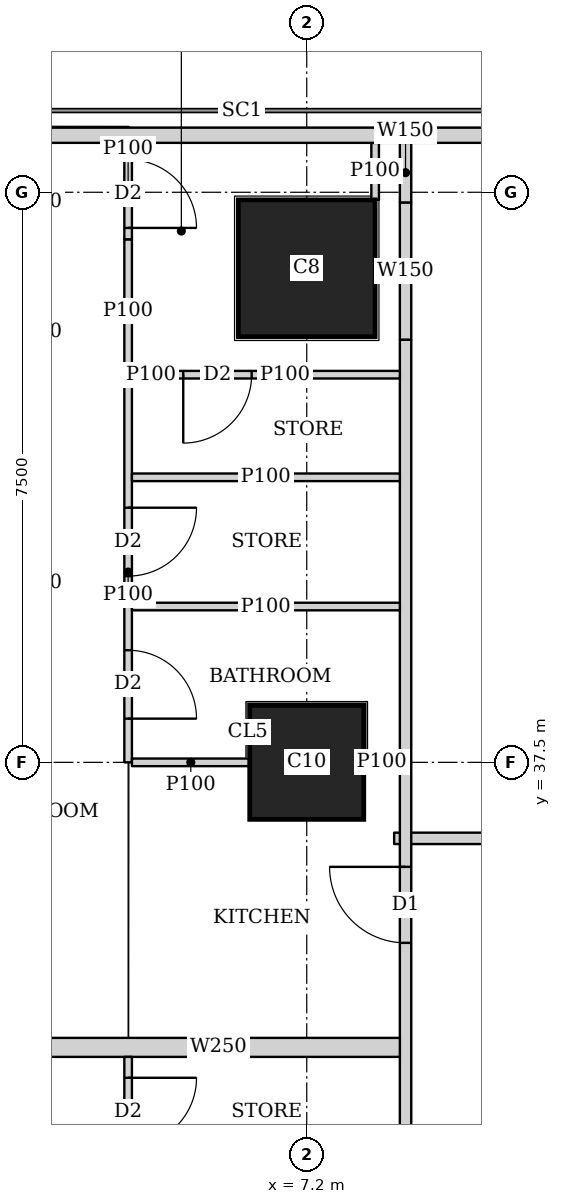
"""IFC4 building model, lengths in metres.
Left out: names, types, materials, properties, quantities, classifications, styles, units other than length and angle.
Written with IfcOpenShell. Run it as: python <this file> out.ifc"""

import sys

from ifc_helpers import new_model, si_unit, direction, frame, frame_2d, origin, origin_2d, place, context, subcontext, project, spatial, rectangle, extrude, element, fill, save


model = new_model("IFC4")
c1 = context("Model", 3, precision=1e-05, world=origin(), true_north=direction((0.0, 1.0)))
c2 = subcontext(c1, "Body", "Model", "MODEL_VIEW")
j1 = project(units=[si_unit("LENGTHUNIT", "METRE"), si_unit("PLANEANGLEUNIT", "RADIAN")], contexts=[c1])
p1 = place(None, origin())
s1 = spatial("IfcSite", under=j1, at=p1, CompositionType="ELEMENT")
p2 = place(p1, origin())
s2 = spatial("IfcBuilding", under=s1, at=p2, CompositionType="ELEMENT")
p3 = place(p2, frame((0.0, 0.0, 139.55)))
s3 = spatial("IfcBuildingStorey", under=s2, at=p3, CompositionType="ELEMENT", Elevation=139.55)
p4 = place(p3, frame((7.2, 37.5, 0.0), z_axis=(0.0, 0.0, 1.0), x_axis=(1.0, 0.0, 0.0)))
e1 = element("IfcColumn", 1, at=p4, inside=s3, PredefinedType="COLUMN", context=c2, shape_type="SweptSolid", body=[
    extrude(rectangle(XDim=1.5, YDim=1.5, at=origin_2d()), origin(), (0.0, 0.0, 1.0), 3.75),
])
p5 = place(p3, frame((7.2, 44.0, 0.0), z_axis=(0.0, 0.0, 1.0), x_axis=(1.0, 0.0, 0.0)))
e2 = element("IfcColumn", 2, at=p5, inside=s3, PredefinedType="COLUMN", context=c2, shape_type="SweptSolid", body=[
    extrude(rectangle(XDim=1.8, YDim=1.8, at=origin_2d()), origin(), (0.0, 0.0, 1.0), 3.75),
])
p6 = place(p3, frame((40.106, 45.75, 0.0), z_axis=(0.0, 0.0, 1.0), x_axis=(-1.0, 0.0, 0.0)))
e3 = element("IfcWall", 3, at=p6, inside=s3, PredefinedType="SOLIDWALL", context=c2, shape_type="SweptSolid", body=[
    extrude(rectangle(XDim=37.943, YDim=0.2, at=frame_2d((18.971, 0.0))), origin(), (0.0, 0.0, 1.0), 3.5),
])
p7 = place(p6, frame((8.606, 0.0, 0.9)))
e4 = element("IfcOpeningElement", 4, at=p7, cuts=e3, PredefinedType="OPENING", context=c2, shape_type="SweptSolid", body=[
    extrude(rectangle(XDim=1.8, YDim=1.5, at=frame_2d((0.9, 0.75))), frame((0.0, 0.11, 0.0), z_axis=(0.0, -1.0, 0.0), x_axis=(1.0, 0.0, 0.0)), (0.0, 0.0, 1.0), 0.22),
])
p8 = place(p6, frame((12.206, 0.0, 0.9)))
e5 = element("IfcOpeningElement", 5, at=p8, cuts=e3, PredefinedType="OPENING", context=c2, shape_type="SweptSolid", body=[
    extrude(rectangle(XDim=1.8, YDim=1.5, at=frame_2d((0.9, 0.75))), frame((0.0, 0.11, 0.0), z_axis=(0.0, -1.0, 0.0), x_axis=(1.0, 0.0, 0.0)), (0.0, 0.0, 1.0), 0.22),
])
p9 = place(p6, frame((15.806, 0.0, 0.9)))
e6 = element("IfcOpeningElement", 6, at=p9, cuts=e3, PredefinedType="OPENING", context=c2, shape_type="SweptSolid", body=[
    extrude(rectangle(XDim=1.8, YDim=1.5, at=frame_2d((0.9, 0.75))), frame((0.0, 0.11, 0.0), z_axis=(0.0, -1.0, 0.0), x_axis=(1.0, 0.0, 0.0)), (0.0, 0.0, 1.0), 0.22),
])
p10 = place(p6, frame((19.406, 0.0, 0.9)))
e7 = element("IfcOpeningElement", 7, at=p10, cuts=e3, PredefinedType="OPENING", context=c2, shape_type="SweptSolid", body=[
    extrude(rectangle(XDim=1.8, YDim=1.5, at=frame_2d((0.9, 0.75))), frame((0.0, 0.11, 0.0), z_axis=(0.0, -1.0, 0.0), x_axis=(1.0, 0.0, 0.0)), (0.0, 0.0, 1.0), 0.22),
])
p11 = place(p6, frame((23.006, 0.0, 0.9)))
e8 = element("IfcOpeningElement", 8, at=p11, cuts=e3, PredefinedType="OPENING", context=c2, shape_type="SweptSolid", body=[
    extrude(rectangle(XDim=1.8, YDim=1.5, at=frame_2d((0.9, 0.75))), frame((0.0, 0.11, 0.0), z_axis=(0.0, -1.0, 0.0), x_axis=(1.0, 0.0, 0.0)), (0.0, 0.0, 1.0), 0.22),
])
p12 = place(p6, frame((26.606, 0.0, 0.9)))
e9 = element("IfcOpeningElement", 9, at=p12, cuts=e3, PredefinedType="OPENING", context=c2, shape_type="SweptSolid", body=[
    extrude(rectangle(XDim=1.8, YDim=1.5, at=frame_2d((0.9, 0.75))), frame((0.0, 0.11, 0.0), z_axis=(0.0, -1.0, 0.0), x_axis=(1.0, 0.0, 0.0)), (0.0, 0.0, 1.0), 0.22),
])
p13 = place(p3, frame((8.5, 1.964, 0.0), z_axis=(0.0, 0.0, 1.0), x_axis=(0.0, 1.0, 0.0)))
e10 = element("IfcWall", 10, at=p13, inside=s3, PredefinedType="SOLIDWALL", context=c2, shape_type="SweptSolid", body=[
    extrude(rectangle(XDim=41.097, YDim=0.15, at=frame_2d((20.548, 0.0))), origin(), (0.0, 0.0, 1.0), 3.5),
])
p14 = place(p13, frame((6.911, 0.0, 0.0)))
e11 = element("IfcOpeningElement", 11, at=p14, cuts=e10, PredefinedType="OPENING", context=c2, shape_type="SweptSolid", body=[
    extrude(rectangle(XDim=1.0, YDim=2.1, at=frame_2d((0.5, 1.05))), frame((0.0, 0.085, 0.0), z_axis=(0.0, -1.0, 0.0), x_axis=(1.0, 0.0, 0.0)), (0.0, 0.0, 1.0), 0.17),
])
p15 = place(p13, frame((10.661, 0.0, 0.0)))
e12 = element("IfcOpeningElement", 12, at=p15, cuts=e10, PredefinedType="OPENING", context=c2, shape_type="SweptSolid", body=[
    extrude(rectangle(XDim=1.0, YDim=2.1, at=frame_2d((0.5, 1.05))), frame((0.0, 0.085, 0.0), z_axis=(0.0, -1.0, 0.0), x_axis=(1.0, 0.0, 0.0)), (0.0, 0.0, 1.0), 0.17),
])
p16 = place(p13, frame((25.661, 0.0, 0.0)))
e13 = element("IfcOpeningElement", 13, at=p16, cuts=e10, PredefinedType="OPENING", context=c2, shape_type="SweptSolid", body=[
    extrude(rectangle(XDim=1.0, YDim=2.1, at=frame_2d((0.5, 1.05))), frame((0.0, 0.085, 0.0), z_axis=(0.0, -1.0, 0.0), x_axis=(1.0, 0.0, 0.0)), (0.0, 0.0, 1.0), 0.17),
])
p17 = place(p13, frame((33.161, 0.0, 0.0)))
e14 = element("IfcOpeningElement", 14, at=p17, cuts=e10, PredefinedType="OPENING", context=c2, shape_type="SweptSolid", body=[
    extrude(rectangle(XDim=1.0, YDim=2.1, at=frame_2d((0.5, 1.05))), frame((0.0, 0.085, 0.0), z_axis=(0.0, -1.0, 0.0), x_axis=(1.0, 0.0, 0.0)), (0.0, 0.0, 1.0), 0.17),
])
p18 = place(p3, frame((8.5, 43.061, 0.0), z_axis=(0.0, 0.0, 1.0), x_axis=(0.0, 1.0, 0.0)))
e15 = element("IfcWall", 15, at=p18, inside=s3, PredefinedType="SOLIDWALL", context=c2, shape_type="SweptSolid", body=[
    extrude(rectangle(XDim=1.805, YDim=0.15, at=frame_2d((0.902, 0.0))), origin(), (0.0, 0.0, 1.0), 2.1),
])
p19 = place(p3, frame((8.5, 44.866, 0.0), z_axis=(0.0, 0.0, 1.0), x_axis=(0.0, 1.0, 0.0)))
e16 = element("IfcWall", 16, at=p19, inside=s3, PredefinedType="SOLIDWALL", context=c2, shape_type="SweptSolid", body=[
    extrude(rectangle(XDim=0.784, YDim=0.15, at=frame_2d((0.392, 0.0))), origin(), (0.0, 0.0, 1.0), 3.5),
])
p20 = place(p3, frame((8.35, 36.5, 0.0), z_axis=(0.0, 0.0, 1.0), x_axis=(1.0, 0.0, 0.0)))
e17 = element("IfcWall", 17, at=p20, inside=s3, PredefinedType="SOLIDWALL", context=c2, shape_type="SweptSolid", body=[
    extrude(rectangle(XDim=26.415, YDim=0.15, at=frame_2d((13.208, 0.0))), origin(), (0.0, 0.0, 1.0), 3.5),
])
p21 = place(p20, frame((2.6, 0.0, 0.0)))
e18 = element("IfcOpeningElement", 18, at=p21, cuts=e17, PredefinedType="OPENING", context=c2, shape_type="SweptSolid", body=[
    extrude(rectangle(XDim=1.0, YDim=2.1, at=frame_2d((0.5, 1.05))), frame((0.0, 0.085, 0.0), z_axis=(0.0, -1.0, 0.0), x_axis=(1.0, 0.0, 0.0)), (0.0, 0.0, 1.0), 0.17),
])
p22 = place(p20, frame((10.75, 0.0, 0.0)))
e19 = element("IfcOpeningElement", 19, at=p22, cuts=e17, PredefinedType="OPENING", context=c2, shape_type="SweptSolid", body=[
    extrude(rectangle(XDim=1.0, YDim=2.1, at=frame_2d((0.5, 1.05))), frame((0.0, 0.085, 0.0), z_axis=(0.0, -1.0, 0.0), x_axis=(1.0, 0.0, 0.0)), (0.0, 0.0, 1.0), 0.17),
])
p23 = place(p3, frame((8.1, 45.65, 0.0), z_axis=(0.0, 0.0, 1.0), x_axis=(0.0, -1.0, 0.0)))
e20 = element("IfcWall", 20, at=p23, inside=s3, PredefinedType="PARTITIONING", context=c2, shape_type="SweptSolid", body=[
    extrude(rectangle(XDim=0.749, YDim=0.1, at=frame_2d((0.375, 0.0))), origin(), (0.0, 0.0, 1.0), 3.5),
])
p24 = place(p3, frame((4.85, 30.0, 0.0), z_axis=(0.0, 0.0, 1.0), x_axis=(0.0, 1.0, 0.0)))
e21 = element("IfcWall", 21, at=p24, inside=s3, PredefinedType="PARTITIONING", context=c2, shape_type="SweptSolid", body=[
    extrude(rectangle(XDim=3.625, YDim=0.1, at=frame_2d((1.812, 0.0))), origin(), (0.0, 0.0, 1.0), 3.5),
])
p25 = place(p24, frame((0.575, 0.0, 0.0)))
e22 = element("IfcOpeningElement", 22, at=p25, cuts=e21, PredefinedType="OPENING", context=c2, shape_type="SweptSolid", body=[
    extrude(rectangle(XDim=0.9, YDim=2.1, at=frame_2d((0.45, 1.05))), frame((0.0, 0.06, 0.0), z_axis=(0.0, -1.0, 0.0), x_axis=(1.0, 0.0, 0.0)), (0.0, 0.0, 1.0), 0.12),
])
p26 = place(p24, frame((2.45, 0.0, 0.0)))
e23 = element("IfcOpeningElement", 23, at=p26, cuts=e21, PredefinedType="OPENING", context=c2, shape_type="SweptSolid", body=[
    extrude(rectangle(XDim=0.9, YDim=2.1, at=frame_2d((0.45, 1.05))), frame((0.0, 0.06, 0.0), z_axis=(0.0, -1.0, 0.0), x_axis=(1.0, 0.0, 0.0)), (0.0, 0.0, 1.0), 0.12),
])
p27 = place(p3, frame((4.85, 37.5, 0.0), z_axis=(0.0, 0.0, 1.0), x_axis=(0.0, 1.0, 0.0)))
e24 = element("IfcWall", 24, at=p27, inside=s3, PredefinedType="PARTITIONING", context=c2, shape_type="SweptSolid", body=[
    extrude(rectangle(XDim=5.007, YDim=0.1, at=frame_2d((2.503, 0.0))), origin(), (0.0, 0.0, 1.0), 3.5),
])
p28 = place(p27, frame((0.575, 0.0, 0.0)))
e25 = element("IfcOpeningElement", 25, at=p28, cuts=e24, PredefinedType="OPENING", context=c2, shape_type="SweptSolid", body=[
    extrude(rectangle(XDim=0.9, YDim=2.1, at=frame_2d((0.45, 1.05))), frame((0.0, 0.06, 0.0), z_axis=(0.0, -1.0, 0.0), x_axis=(1.0, 0.0, 0.0)), (0.0, 0.0, 1.0), 0.12),
])
p29 = place(p27, frame((2.45, 0.0, 0.0)))
e26 = element("IfcOpeningElement", 26, at=p29, cuts=e24, PredefinedType="OPENING", context=c2, shape_type="SweptSolid", body=[
    extrude(rectangle(XDim=0.9, YDim=2.1, at=frame_2d((0.45, 1.05))), frame((0.0, 0.06, 0.0), z_axis=(0.0, -1.0, 0.0), x_axis=(1.0, 0.0, 0.0)), (0.0, 0.0, 1.0), 0.12),
])
p30 = place(p3, frame((4.85, 42.507, 0.0), z_axis=(0.0, 0.0, 1.0), x_axis=(0.0, 1.0, 0.0)))
e27 = element("IfcWall", 27, at=p30, inside=s3, PredefinedType="PARTITIONING", context=c2, shape_type="SweptSolid", body=[
    extrude(rectangle(XDim=1.874, YDim=0.1, at=frame_2d((0.937, 0.0))), origin(), (0.0, 0.0, 1.0), 2.1),
])
p31 = place(p3, frame((4.85, 44.381, 0.0), z_axis=(0.0, 0.0, 1.0), x_axis=(0.0, 1.0, 0.0)))
e28 = element("IfcWall", 28, at=p31, inside=s3, PredefinedType="PARTITIONING", context=c2, shape_type="SweptSolid", body=[
    extrude(rectangle(XDim=1.269, YDim=0.1, at=frame_2d((0.634, 0.0))), origin(), (0.0, 0.0, 1.0), 3.5),
])
p32 = place(p31, frame((0.15, 0.0, 0.0)))
e29 = element("IfcOpeningElement", 29, at=p32, cuts=e28, PredefinedType="OPENING", context=c2, shape_type="SweptSolid", body=[
    extrude(rectangle(XDim=0.9, YDim=2.1, at=frame_2d((0.45, 1.05))), frame((0.0, 0.06, 0.0), z_axis=(0.0, -1.0, 0.0), x_axis=(1.0, 0.0, 0.0)), (0.0, 0.0, 1.0), 0.12),
])
p33 = place(p3, frame((4.9, 37.5, 0.0), z_axis=(0.0, 0.0, 1.0), x_axis=(1.0, 0.0, 0.0)))
e30 = element("IfcWall", 30, at=p33, inside=s3, PredefinedType="PARTITIONING", context=c2, shape_type="SweptSolid", body=[
    extrude(rectangle(XDim=1.549, YDim=0.1, at=frame_2d((0.774, 0.0))), origin(), (0.0, 0.0, 1.0), 3.5),
])
p34 = place(p3, frame((7.951, 37.5, 0.0), z_axis=(0.0, 0.0, 1.0), x_axis=(1.0, 0.0, 0.0)))
e31 = element("IfcWall", 31, at=p34, inside=s3, PredefinedType="PARTITIONING", context=c2, shape_type="SweptSolid", body=[
    extrude(rectangle(XDim=0.474, YDim=0.1, at=frame_2d((0.237, 0.0))), origin(), (0.0, 0.0, 1.0), 3.5),
])
for number, where, z_axis, x_axis in (
    (32, (4.9, 41.25, 0.0), (0.0, 0.0, 1.0), (1.0, 0.0, 0.0)),
    (33, (4.9, 39.55, 0.0), (0.0, 0.0, 1.0), (1.0, 0.0, 0.0)),
):
    element("IfcWall", number, at=place(p3, frame(where, z_axis=z_axis, x_axis=x_axis)), inside=s3, PredefinedType="PARTITIONING", context=c2, shape_type="SweptSolid", body=[
        extrude(rectangle(XDim=3.525, YDim=0.1, at=frame_2d((1.763, 0.0))), origin(), (0.0, 0.0, 1.0), 3.5),
    ])
p35 = place(p3, frame((3.65, 33.75, 0.0), z_axis=(0.0, 0.0, 1.0), x_axis=(1.0, 0.0, 0.0)))
e34 = element("IfcWall", 34, at=p35, inside=s3, PredefinedType="SOLIDWALL", context=c2, shape_type="SweptSolid", body=[
    extrude(rectangle(XDim=4.775, YDim=0.25, at=frame_2d((2.388, 0.0))), origin(), (0.0, 0.0, 1.0), 3.5),
])
p36 = place(p3, frame((8.425, 42.6, 0.0), z_axis=(0.0, 0.0, 1.0), x_axis=(-1.0, 0.0, 0.0)))
e35 = element("IfcWall", 35, at=p36, inside=s3, PredefinedType="PARTITIONING", context=c2, shape_type="SweptSolid", body=[
    extrude(rectangle(XDim=3.022, YDim=0.1, at=frame_2d((1.511, 0.0))), origin(), (0.0, 0.0, 1.0), 3.5),
])
p37 = place(p36, frame((1.95, 0.0, 0.0)))
e36 = element("IfcOpeningElement", 36, at=p37, cuts=e35, PredefinedType="OPENING", context=c2, shape_type="SweptSolid", body=[
    extrude(rectangle(XDim=0.9, YDim=2.1, at=frame_2d((0.45, 1.05))), frame((0.0, 0.06, 0.0), z_axis=(0.0, -1.0, 0.0), x_axis=(1.0, 0.0, 0.0)), (0.0, 0.0, 1.0), 0.12),
])
p38 = place(p3, frame((5.403, 42.6, 0.0), z_axis=(0.0, 0.0, 1.0), x_axis=(-1.0, 0.0, 0.0)))
e37 = element("IfcWall", 37, at=p38, inside=s3, PredefinedType="PARTITIONING", context=c2, shape_type="SweptSolid", body=[
    extrude(rectangle(XDim=0.503, YDim=0.1, at=frame_2d((0.251, 0.0))), origin(), (0.0, 0.0, 1.0), 2.1),
])
p39 = place(p26, origin())
e38 = element("IfcDoor", 38, at=p39, inside=s3, OperationType="SINGLE_SWING_LEFT", PredefinedType="DOOR", context=c2, shape_type="SweptSolid", body=[
    extrude(rectangle(XDim=0.9, YDim=2.1, at=frame_2d((0.45, 1.05))), frame((0.0, 0.025, 0.0), z_axis=(0.0, -1.0, 0.0), x_axis=(1.0, 0.0, 0.0)), (0.0, 0.0, 1.0), 0.05),
])
fill(e23, e38)
p40 = place(p28, origin())
e39 = element("IfcDoor", 39, at=p40, inside=s3, OperationType="SINGLE_SWING_RIGHT", PredefinedType="DOOR", context=c2, shape_type="SweptSolid", body=[
    extrude(rectangle(XDim=0.9, YDim=2.1, at=frame_2d((0.45, 1.05))), frame((0.0, 0.025, 0.0), z_axis=(0.0, -1.0, 0.0), x_axis=(1.0, 0.0, 0.0)), (0.0, 0.0, 1.0), 0.05),
])
fill(e25, e39)
p41 = place(p32, origin())
e40 = element("IfcDoor", 40, at=p41, inside=s3, OperationType="SINGLE_SWING_RIGHT", PredefinedType="DOOR", context=c2, shape_type="SweptSolid", body=[
    extrude(rectangle(XDim=0.9, YDim=2.1, at=frame_2d((0.45, 1.05))), frame((0.0, 0.025, 0.0), z_axis=(0.0, -1.0, 0.0), x_axis=(1.0, 0.0, 0.0)), (0.0, 0.0, 1.0), 0.05),
])
fill(e29, e40)
p42 = place(p29, origin())
e41 = element("IfcDoor", 41, at=p42, inside=s3, OperationType="SINGLE_SWING_LEFT", PredefinedType="DOOR", context=c2, shape_type="SweptSolid", body=[
    extrude(rectangle(XDim=0.9, YDim=2.1, at=frame_2d((0.45, 1.05))), frame((0.0, 0.025, 0.0), z_axis=(0.0, -1.0, 0.0), x_axis=(1.0, 0.0, 0.0)), (0.0, 0.0, 1.0), 0.05),
])
fill(e26, e41)
p43 = place(p17, origin())
e42 = element("IfcDoor", 42, at=p43, inside=s3, OperationType="SINGLE_SWING_RIGHT", PredefinedType="DOOR", context=c2, shape_type="SweptSolid", body=[
    extrude(rectangle(XDim=1.0, YDim=2.1, at=frame_2d((0.5, 1.05))), frame((0.0, 0.025, 0.0), z_axis=(0.0, -1.0, 0.0), x_axis=(1.0, 0.0, 0.0)), (0.0, 0.0, 1.0), 0.05),
])
fill(e14, e42)
p44 = place(p37, origin())
e43 = element("IfcDoor", 43, at=p44, inside=s3, OperationType="SINGLE_SWING_RIGHT", PredefinedType="DOOR", context=c2, shape_type="SweptSolid", body=[
    extrude(rectangle(XDim=0.9, YDim=2.1, at=frame_2d((0.45, 1.05))), frame((0.0, 0.025, 0.0), z_axis=(0.0, -1.0, 0.0), x_axis=(1.0, 0.0, 0.0)), (0.0, 0.0, 1.0), 0.05),
])
fill(e36, e43)
save(model, sys.argv[1])
